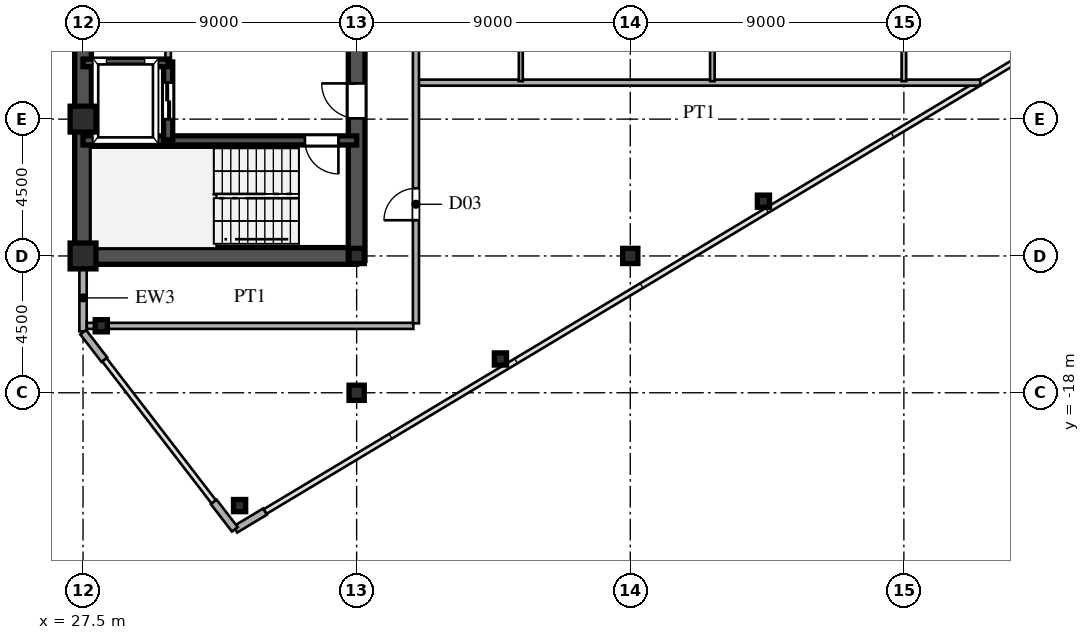
"""IFC4 building model, lengths in metres.
Left out: names, types, materials, properties, quantities, classifications, styles, units other than length and angle.
Written with IfcOpenShell. Run it as: python <this file> out.ifc"""

import sys

from ifc_helpers import new_model, si_unit, direction, frame, frame_2d, origin, origin_2d, place, context, subcontext, project, spatial, rectangle, hollow_rectangle, i_section, extrude, source, transform, mapped, element, fill, save


model = new_model("IFC4")
c1 = context("Model", 3, precision=1e-05, world=origin(), true_north=direction((0.0, 1.0)))
c2 = subcontext(c1, "Body", "Model", "MODEL_VIEW")
j1 = project(units=[si_unit("LENGTHUNIT", "METRE"), si_unit("PLANEANGLEUNIT", "RADIAN")], contexts=[c1])
p1 = place(None, origin())
s1 = spatial("IfcSite", under=j1, at=p1, CompositionType="ELEMENT")
p2 = place(p1, origin())
s2 = spatial("IfcBuilding", under=s1, at=p2, CompositionType="ELEMENT")
p3 = place(p2, frame((0.0, 0.0, 195.9)))
s3 = spatial("IfcBuildingStorey", under=s2, at=p3, CompositionType="ELEMENT", Elevation=195.9)
m1 = source(origin(), c2, "Body", "SweptSolid", [
    extrude(hollow_rectangle(XDim=0.85, YDim=0.85, WallThickness=0.036, at=origin_2d()), origin(), (0.0, 0.0, 1.0), 3.6),
])
for number, where, z_axis, x_axis in (
    (1, (27.5, -13.5, 0.0), (0.0, 0.0, 1.0), (1.0, 0.0, 0.0)),
    (2, (27.5, -9.0, 0.0), (0.0, 0.0, 1.0), (1.0, 0.0, 0.0)),
):
    element("IfcColumn", number, at=place(p3, frame(where, z_axis=z_axis, x_axis=x_axis)), inside=s3, PredefinedType="COLUMN", context=c2, shape_type="MappedRepresentation", body=[
        mapped(m1, transform((0.0, 0.0, 0.0), scale=1.0)),
    ])
m2 = source(origin(), c2, "Body", "SweptSolid", [
    extrude(i_section(OverallWidth=0.5, OverallDepth=0.5, WebThickness=0.02, FlangeThickness=0.032, at=origin_2d()), origin(), (0.0, 0.0, 1.0), 3.6),
])
for number, where, z_axis, x_axis in (
    (3, (36.5, -18.0, 0.0), (0.0, 0.0, 1.0), (1.0, 0.0, 0.0)),
    (4, (36.5, -13.5, 0.0), (0.0, 0.0, 1.0), (1.0, 0.0, 0.0)),
    (5, (45.5, -13.5, 0.0), (0.0, 0.0, 1.0), (1.0, 0.0, 0.0)),
):
    element("IfcColumn", number, at=place(p3, frame(where, z_axis=z_axis, x_axis=x_axis)), inside=s3, PredefinedType="COLUMN", context=c2, shape_type="MappedRepresentation", body=[
        mapped(m2, transform((0.0, 0.0, 0.0), scale=1.0)),
    ])
m3 = source(origin(), c2, "Body", "SweptSolid", [
    extrude(hollow_rectangle(XDim=0.4, YDim=0.4, WallThickness=0.016, at=origin_2d()), origin(), (0.0, 0.0, 1.0), 3.6),
])
for number, where, z_axis, x_axis in (
    (6, (32.65, -21.71, 0.0), (0.0, 0.0, 1.0), (1.0, 0.0, 0.0)),
    (7, (28.1, -15.796, 0.0), (0.0, 0.0, 1.0), (1.0, 0.0, 0.0)),
    (8, (41.23, -16.889, 0.0), (0.0, 0.0, 1.0), (1.0, 0.0, 0.0)),
    (9, (49.88, -11.699, 0.0), (0.0, 0.0, 1.0), (1.0, 0.0, 0.0)),
):
    element("IfcColumn", number, at=place(p3, frame(where, z_axis=z_axis, x_axis=x_axis)), inside=s3, PredefinedType="COLUMN", context=c2, shape_type="MappedRepresentation", body=[
        mapped(m3, transform((0.0, 0.0, 0.0), scale=1.0)),
    ])
p4 = place(p3, frame((32.509, -22.495, 0.0), z_axis=(0.0, 0.0, 1.0), x_axis=(0.85743623509, 0.514590228002, 0.0)))
e10 = element("IfcWall", 10, at=p4, inside=s3, PredefinedType="SOLIDWALL", context=c2, shape_type="SweptSolid", body=[
    extrude(rectangle(XDim=1.14, YDim=0.24, at=frame_2d((0.57, 0.0))), origin(), (0.0, 0.0, 1.0), 3.38),
])
p5 = place(p3, frame((27.5, -15.98, 0.0), z_axis=(0.0, 0.0, 1.0), x_axis=(0.0, 1.0, 0.0)))
e11 = element("IfcWall", 11, at=p5, inside=s3, PredefinedType="SOLIDWALL", context=c2, shape_type="SweptSolid", body=[
    extrude(rectangle(XDim=1.6, YDim=0.24, at=frame_2d((0.8, 0.0))), origin(), (0.0, 0.0, 1.0), 3.38),
])
p6 = place(p3, frame((27.5, -14.38, 0.0), z_axis=(0.0, 0.0, 1.0), x_axis=(0.0, 1.0, 0.0)))
e12 = element("IfcWall", 12, at=p6, inside=s3, PredefinedType="SOLIDWALL", context=c2, shape_type="SweptSolid", body=[
    extrude(rectangle(XDim=0.6, YDim=0.24, at=frame_2d((0.3, 0.0))), origin(), (0.0, 0.0, 1.0), 2.88),
])
for number, where, z_axis, x_axis in (
    (13, (27.506, -16.008, 0.0), (0.0, 0.0, 1.0), (0.61, -0.793, 0.0)),
    (14, (31.799, -21.588, 0.0), (0.0, 0.0, 1.0), (0.61, -0.793, 0.0)),
):
    element("IfcWall", number, at=place(p3, frame(where, z_axis=z_axis, x_axis=x_axis)), inside=s3, PredefinedType="SOLIDWALL", context=c2, shape_type="SweptSolid", body=[
        extrude(rectangle(XDim=1.14, YDim=0.24, at=frame_2d((0.57, 0.0))), origin(), (0.0, 0.0, 1.0), 3.38),
    ])
p7 = place(p3, frame((27.5, -13.5, 0.0), z_axis=(0.0, 0.0, 1.0), x_axis=(0.0, 1.0, 0.0)))
e15 = element("IfcWall", 15, at=p7, inside=s3, PredefinedType="SHEAR", context=c2, shape_type="SweptSolid", body=[
    extrude(rectangle(XDim=12.2, YDim=0.55, at=frame_2d((6.1, 0.0))), origin(), (0.0, 0.0, 1.0), 3.38),
])
p8 = place(p3, frame((27.5, -13.5, 0.0), z_axis=(0.0, 0.0, 1.0), x_axis=(1.0, 0.0, 0.0)))
e16 = element("IfcWall", 16, at=p8, inside=s3, PredefinedType="SHEAR", context=c2, shape_type="SweptSolid", body=[
    extrude(rectangle(XDim=9.0, YDim=0.55, at=frame_2d((4.5, 0.0))), origin(), (0.0, 0.0, 1.0), 3.38),
])
p9 = place(p3, frame((36.5, -13.65, 0.0), z_axis=(0.0, 0.0, 1.0), x_axis=(0.0, 1.0, 0.0)))
e17 = element("IfcWall", 17, at=p9, inside=s3, PredefinedType="SHEAR", context=c2, shape_type="SweptSolid", body=[
    extrude(rectangle(XDim=7.15, YDim=0.55, at=frame_2d((3.575, 0.0))), origin(), (0.0, 0.0, 1.0), 3.38),
])
p10 = place(p9, frame((4.675, 0.0, 0.0)))
e18 = element("IfcOpeningElement", 18, at=p10, cuts=e17, PredefinedType="OPENING", context=c2, shape_type="SweptSolid", body=[
    extrude(rectangle(XDim=1.15, YDim=2.2, at=frame_2d((0.575, 1.1))), frame((0.0, 0.285, 0.0), z_axis=(0.0, -1.0, 0.0), x_axis=(1.0, 0.0, 0.0)), (0.0, 0.0, 1.0), 0.57),
])
p11 = place(p3, frame((27.5, -9.7, 0.0), z_axis=(0.0, 0.0, 1.0), x_axis=(1.0, 0.0, 0.0)))
e19 = element("IfcWall", 19, at=p11, inside=s3, PredefinedType="SHEAR", context=c2, shape_type="SweptSolid", body=[
    extrude(rectangle(XDim=9.0, YDim=0.3, at=frame_2d((4.5, 0.0))), origin(), (0.0, 0.0, 1.0), 3.38),
])
p12 = place(p11, frame((7.3, 0.0, 0.0)))
e20 = element("IfcOpeningElement", 20, at=p12, cuts=e19, PredefinedType="OPENING", context=c2, shape_type="SweptSolid", body=[
    extrude(rectangle(XDim=1.1, YDim=2.2, at=frame_2d((0.55, 1.1))), frame((0.0, 0.16, 0.0), z_axis=(0.0, -1.0, 0.0), x_axis=(1.0, 0.0, 0.0)), (0.0, 0.0, 1.0), 0.32),
])
p13 = place(p3, frame((27.5, -7.15, 0.0), z_axis=(0.0, 0.0, 1.0), x_axis=(1.0, 0.0, 0.0)))
e21 = element("IfcWall", 21, at=p13, inside=s3, PredefinedType="SHEAR", context=c2, shape_type="SweptSolid", body=[
    extrude(rectangle(XDim=2.8, YDim=0.25, at=frame_2d((1.4, 0.0))), origin(), (0.0, 0.0, 1.0), 3.38),
])
p14 = place(p3, frame((30.3, -9.68, 0.0), z_axis=(0.0, 0.0, 1.0), x_axis=(0.0, 1.0, 0.0)))
e22 = element("IfcWall", 22, at=p14, inside=s3, PredefinedType="SHEAR", context=c2, shape_type="SweptSolid", body=[
    extrude(rectangle(XDim=2.56, YDim=0.3, at=frame_2d((1.28, 0.0))), origin(), (0.0, 0.0, 1.0), 3.38),
])
p15 = place(p14, frame((0.68, 0.0, 0.0)))
e23 = element("IfcOpeningElement", 23, at=p15, cuts=e22, PredefinedType="OPENING", context=c2, shape_type="SweptSolid", body=[
    extrude(rectangle(XDim=1.2, YDim=2.25, at=frame_2d((0.6, 1.125))), frame((0.0, 0.16, 0.0), z_axis=(0.0, -1.0, 0.0), x_axis=(1.0, 0.0, 0.0)), (0.0, 0.0, 1.0), 0.32),
])
p16 = place(p3, frame((30.3, -7.12, 0.0), z_axis=(0.0, 0.0, 1.0), x_axis=(0.0, 1.0, 0.0)))
e24 = element("IfcWall", 24, at=p16, inside=s3, PredefinedType="PARTITIONING", context=c2, shape_type="SweptSolid", body=[
    extrude(rectangle(XDim=5.74, YDim=0.18, at=frame_2d((2.87, 0.0))), origin(), (0.0, 0.0, 1.0), 3.38),
])
p17 = place(p3, frame((27.625, -15.8, 0.0), z_axis=(0.0, 0.0, 1.0), x_axis=(1.0, 0.0, 0.0)))
e25 = element("IfcWall", 25, at=p17, inside=s3, PredefinedType="PARTITIONING", context=c2, shape_type="SweptSolid", body=[
    extrude(rectangle(XDim=10.74, YDim=0.2, at=frame_2d((5.37, 0.0))), origin(), (0.0, 0.0, 1.0), 3.38),
])
p18 = place(p3, frame((38.53, -7.8, 0.0), z_axis=(0.0, 0.0, 1.0), x_axis=(1.0, 0.0, 0.0)))
e26 = element("IfcWall", 26, at=p18, inside=s3, PredefinedType="PARTITIONING", context=c2, shape_type="SweptSolid", body=[
    extrude(rectangle(XDim=18.48, YDim=0.2, at=frame_2d((9.24, 0.0))), origin(), (0.0, 0.0, 1.0), 3.38),
])
p19 = place(p3, frame((38.45, -15.715, 0.0), z_axis=(0.0, 0.0, 1.0), x_axis=(0.0, 1.0, 0.0)))
e27 = element("IfcWall", 27, at=p19, inside=s3, PredefinedType="PARTITIONING", context=c2, shape_type="SweptSolid", body=[
    extrude(rectangle(XDim=31.43, YDim=0.2, at=frame_2d((15.715, 0.0))), origin(), (0.0, 0.0, 1.0), 3.38),
])
p20 = place(p19, frame((3.39, 0.0, 0.0)))
e28 = element("IfcOpeningElement", 28, at=p20, cuts=e27, PredefinedType="OPENING", context=c2, shape_type="SweptSolid", body=[
    extrude(rectangle(XDim=1.05, YDim=2.25, at=frame_2d((0.525, 1.125))), frame((0.0, 0.11, 0.0), z_axis=(0.0, -1.0, 0.0), x_axis=(1.0, 0.0, 0.0)), (0.0, 0.0, 1.0), 0.22),
])
p21 = place(p19, frame((13.986, 0.0, 0.0)))
e29 = element("IfcOpeningElement", 29, at=p21, cuts=e27, PredefinedType="OPENING", context=c2, shape_type="SweptSolid", body=[
    extrude(rectangle(XDim=1.05, YDim=2.25, at=frame_2d((0.525, 1.125))), frame((0.0, 0.11, 0.0), z_axis=(0.0, -1.0, 0.0), x_axis=(1.0, 0.0, 0.0)), (0.0, 0.0, 1.0), 0.22),
])
p22 = place(p19, frame((22.387, 0.0, 0.0)))
e30 = element("IfcOpeningElement", 30, at=p22, cuts=e27, PredefinedType="OPENING", context=c2, shape_type="SweptSolid", body=[
    extrude(rectangle(XDim=1.05, YDim=2.25, at=frame_2d((0.525, 1.125))), frame((0.0, 0.11, 0.0), z_axis=(0.0, -1.0, 0.0), x_axis=(1.0, 0.0, 0.0)), (0.0, 0.0, 1.0), 0.22),
])
p23 = place(p3, frame((41.9, -7.75, 0.0), z_axis=(0.0, 0.0, 1.0), x_axis=(0.0, 1.0, 0.0)))
e31 = element("IfcWall", 31, at=p23, inside=s3, PredefinedType="PARTITIONING", context=c2, shape_type="SweptSolid", body=[
    extrude(rectangle(XDim=8.967, YDim=0.13, at=frame_2d((4.483, 0.0))), origin(), (0.0, 0.0, 1.0), 3.38),
])
p24 = place(p23, frame((6.275, 0.0, 0.0)))
e32 = element("IfcOpeningElement", 32, at=p24, cuts=e31, PredefinedType="OPENING", context=c2, shape_type="SweptSolid", body=[
    extrude(rectangle(XDim=0.95, YDim=2.15, at=frame_2d((0.475, 1.075))), frame((0.0, 0.075, 0.0), z_axis=(0.0, -1.0, 0.0), x_axis=(1.0, 0.0, 0.0)), (0.0, 0.0, 1.0), 0.15),
])
p25 = place(p3, frame((48.2, -7.75, 0.0), z_axis=(0.0, 0.0, 1.0), x_axis=(0.0, 1.0, 0.0)))
e33 = element("IfcWall", 33, at=p25, inside=s3, PredefinedType="PARTITIONING", context=c2, shape_type="SweptSolid", body=[
    extrude(rectangle(XDim=13.5, YDim=0.15, at=frame_2d((6.75, 0.0))), origin(), (0.0, 0.0, 1.0), 3.38),
])
p26 = place(p25, frame((6.275, 0.0, 0.0)))
e34 = element("IfcOpeningElement", 34, at=p26, cuts=e33, PredefinedType="OPENING", context=c2, shape_type="SweptSolid", body=[
    extrude(rectangle(XDim=0.95, YDim=2.15, at=frame_2d((0.475, 1.075))), frame((0.0, 0.085, 0.0), z_axis=(0.0, -1.0, 0.0), x_axis=(1.0, 0.0, 0.0)), (0.0, 0.0, 1.0), 0.17),
])
p27 = place(p25, frame((1.742, 0.0, 0.0)))
e35 = element("IfcOpeningElement", 35, at=p27, cuts=e33, PredefinedType="OPENING", context=c2, shape_type="SweptSolid", body=[
    extrude(rectangle(XDim=0.95, YDim=2.15, at=frame_2d((0.475, 1.075))), frame((0.0, 0.085, 0.0), z_axis=(0.0, -1.0, 0.0), x_axis=(1.0, 0.0, 0.0)), (0.0, 0.0, 1.0), 0.17),
])
p28 = place(p3, frame((54.5, -7.75, 0.0), z_axis=(0.0, 0.0, 1.0), x_axis=(0.0, 1.0, 0.0)))
e36 = element("IfcWall", 36, at=p28, inside=s3, PredefinedType="PARTITIONING", context=c2, shape_type="SweptSolid", body=[
    extrude(rectangle(XDim=17.085, YDim=0.15, at=frame_2d((8.542, 0.0))), origin(), (0.0, 0.0, 1.0), 2.78),
])
p29 = place(p28, frame((6.275, 0.0, 0.0)))
e37 = element("IfcOpeningElement", 37, at=p29, cuts=e36, PredefinedType="OPENING", context=c2, shape_type="SweptSolid", body=[
    extrude(rectangle(XDim=0.95, YDim=2.15, at=frame_2d((0.475, 1.075))), frame((0.0, 0.085, 0.0), z_axis=(0.0, -1.0, 0.0), x_axis=(1.0, 0.0, 0.0)), (0.0, 0.0, 1.0), 0.17),
])
p30 = place(p28, frame((10.808, 0.0, 0.0)))
e38 = element("IfcOpeningElement", 38, at=p30, cuts=e36, PredefinedType="OPENING", context=c2, shape_type="SweptSolid", body=[
    extrude(rectangle(XDim=0.95, YDim=2.15, at=frame_2d((0.475, 1.075))), frame((0.0, 0.085, 0.0), z_axis=(0.0, -1.0, 0.0), x_axis=(1.0, 0.0, 0.0)), (0.0, 0.0, 1.0), 0.17),
])
p31 = place(p28, frame((14.825, 0.0, 0.0)))
e39 = element("IfcOpeningElement", 39, at=p31, cuts=e36, PredefinedType="OPENING", context=c2, shape_type="SweptSolid", body=[
    extrude(rectangle(XDim=0.95, YDim=2.15, at=frame_2d((0.475, 1.075))), frame((0.0, 0.085, 0.0), z_axis=(0.0, -1.0, 0.0), x_axis=(1.0, 0.0, 0.0)), (0.0, 0.0, 1.0), 0.17),
])
m4 = source(origin(), c2, "Body", "SweptSolid", [
    extrude(rectangle(XDim=1.15, YDim=2.2, at=frame_2d((0.575, 1.1))), frame((0.0, 0.025, 0.0), z_axis=(0.0, -1.0, 0.0), x_axis=(1.0, 0.0, 0.0)), (0.0, 0.0, 1.0), 0.05),
])
p32 = place(p10, origin())
e40 = element("IfcDoor", 40, at=p32, inside=s3, OperationType="SINGLE_SWING_RIGHT", PredefinedType="DOOR", context=c2, shape_type="MappedRepresentation", body=[
    mapped(m4, transform((0.0, 0.0, 0.0), scale=1.0)),
])
fill(e18, e40)
m5 = source(origin(), c2, "Body", "SweptSolid", [
    extrude(rectangle(XDim=1.1, YDim=2.2, at=frame_2d((0.55, 1.1))), frame((0.0, 0.025, 0.0), z_axis=(0.0, -1.0, 0.0), x_axis=(1.0, 0.0, 0.0)), (0.0, 0.0, 1.0), 0.05),
])
p33 = place(p12, frame((1.1, 0.0, 0.0), z_axis=(0.0, 0.0, 1.0), x_axis=(-1.0, 0.0, 0.0)))
e41 = element("IfcDoor", 41, at=p33, inside=s3, OperationType="SINGLE_SWING_RIGHT", PredefinedType="DOOR", context=c2, shape_type="MappedRepresentation", body=[
    mapped(m5, transform((0.0, 0.0, 0.0), scale=1.0)),
])
fill(e20, e41)
m6 = source(origin(), c2, "Body", "SweptSolid", [
    extrude(rectangle(XDim=1.2, YDim=2.25, at=frame_2d((0.6, 1.125))), frame((0.0, 0.025, 0.0), z_axis=(0.0, -1.0, 0.0), x_axis=(1.0, 0.0, 0.0)), (0.0, 0.0, 1.0), 0.05),
])
p34 = place(p15, origin())
e42 = element("IfcDoor", 42, at=p34, inside=s3, OperationType="DOUBLE_DOOR_SLIDING", PredefinedType="DOOR", context=c2, shape_type="MappedRepresentation", body=[
    mapped(m6, transform((0.0, 0.0, 0.0), scale=1.0)),
])
fill(e23, e42)
m7 = source(origin(), c2, "Body", "SweptSolid", [
    extrude(rectangle(XDim=1.05, YDim=2.25, at=frame_2d((0.525, 1.125))), frame((0.0, 0.025, 0.0), z_axis=(0.0, -1.0, 0.0), x_axis=(1.0, 0.0, 0.0)), (0.0, 0.0, 1.0), 0.05),
])
p35 = place(p20, origin())
e43 = element("IfcDoor", 43, at=p35, inside=s3, OperationType="SINGLE_SWING_LEFT", PredefinedType="DOOR", context=c2, shape_type="MappedRepresentation", body=[
    mapped(m7, transform((0.0, 0.0, 0.0), scale=1.0)),
])
fill(e28, e43)
save(model, sys.argv[1])
